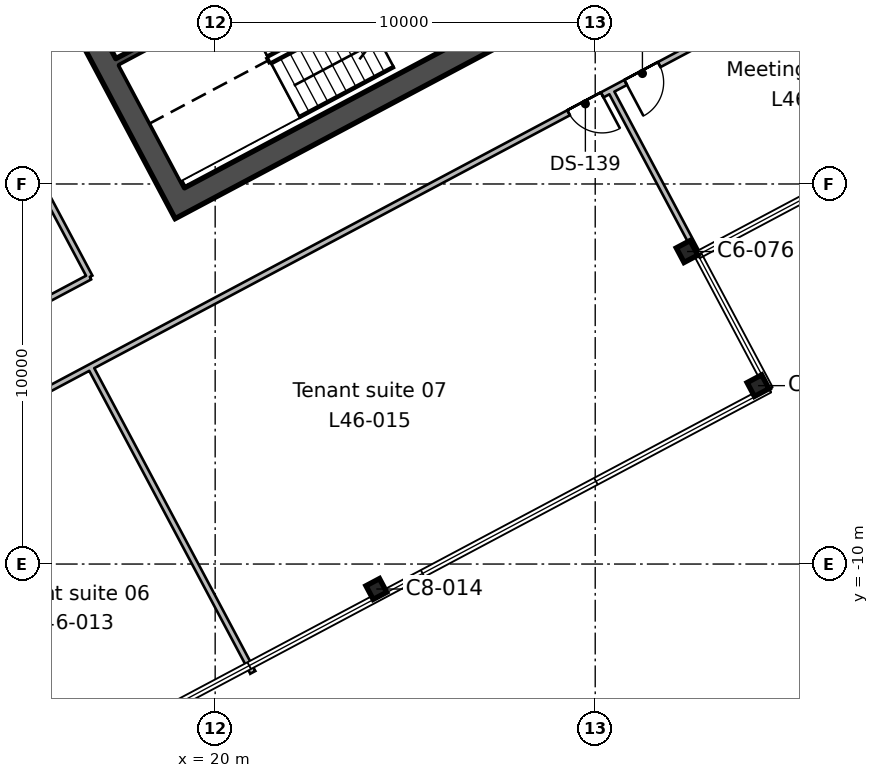
"""IFC4 building model, lengths in metres.
Left out: names, types, materials, properties, quantities, classifications, styles, units other than length and angle.
Written with IfcOpenShell. Run it as: python <this file> out.ifc"""

import sys

from ifc_helpers import new_model, si_unit, direction, frame, frame_2d, origin, origin_2d, place, context, subcontext, project, spatial, rectangle, i_section, extrude, element, fill, save


model = new_model("IFC4")
c1 = context("Model", 3, precision=1e-05, world=origin(), true_north=direction((0.0, 1.0)))
c2 = subcontext(c1, "Body", "Model", "MODEL_VIEW")
j1 = project(units=[si_unit("LENGTHUNIT", "METRE"), si_unit("PLANEANGLEUNIT", "RADIAN")], contexts=[c1])
p1 = place(None, origin())
s1 = spatial("IfcSite", under=j1, at=p1, CompositionType="ELEMENT")
p2 = place(p1, origin())
s2 = spatial("IfcBuilding", under=s1, at=p2, CompositionType="ELEMENT")
p3 = place(p2, frame((0.0, 0.0, 213.0)))
s3 = spatial("IfcBuildingStorey", under=s2, at=p3, CompositionType="ELEMENT", Elevation=213.0)
p4 = place(p3, frame((24.241, -10.657, 0.0), z_axis=(0.0, 0.0, 1.0), x_axis=(0.882947592859, 0.469471562786, 0.0)))
e1 = element("IfcColumn", 1, at=p4, inside=s3, PredefinedType="COLUMN", context=c2, shape_type="SweptSolid", body=[
    extrude(i_section(OverallWidth=0.404, OverallDepth=0.406, WebThickness=0.027, FlangeThickness=0.044, FilletRadius=0.015, at=origin_2d()), origin(), (0.0, 0.0, 1.0), 3.9),
])
for number, where, z_axis, x_axis in (
    (2, (34.285, -5.306, 0.0), (0.0, 0.0, 1.0), (-0.469, 0.883, 0.0)),
    (3, (32.417, -1.777, 0.0), (0.0, 0.0, 1.0), (0.883, 0.469, 0.0)),
):
    element("IfcColumn", number, at=place(p3, frame(where, z_axis=z_axis, x_axis=x_axis)), inside=s3, PredefinedType="COLUMN", context=c2, shape_type="SweptSolid", body=[
        extrude(i_section(OverallWidth=0.412, OverallDepth=0.434, WebThickness=0.036, FlangeThickness=0.057, FilletRadius=0.015, at=origin_2d()), origin(), (0.0, 0.0, 1.0), 3.9),
    ])
p5 = place(p3, frame((19.211, -0.771, 0.0), z_axis=(0.0, 0.0, 1.0), x_axis=(-0.469463742137, 0.882951751127, 0.0)))
e4 = element("IfcWall", 4, at=p5, inside=s3, PredefinedType="SHEAR", context=c2, shape_type="SweptSolid", body=[
    extrude(rectangle(XDim=19.4, YDim=0.6, at=frame_2d((9.7, 0.0))), origin(), (0.0, 0.0, 1.0), 3.9),
])
p6 = place(p5, frame((6.7, 0.0, 0.0)))
e5 = element("IfcOpeningElement", 5, at=p6, cuts=e4, PredefinedType="OPENING", context=c2, shape_type="SweptSolid", body=[
    extrude(rectangle(XDim=2.4, YDim=2.4, at=frame_2d((1.2, 1.2))), frame((0.0, 0.31, 0.0), z_axis=(0.0, -1.0, 0.0), x_axis=(1.0, 0.0, 0.0)), (0.0, 0.0, 1.0), 0.62),
])
p7 = place(p3, frame((19.335, -0.366, 0.0), z_axis=(0.0, 0.0, 1.0), x_axis=(0.88294509198, 0.469476266226, 0.0)))
e6 = element("IfcWall", 6, at=p7, inside=s3, PredefinedType="SHEAR", context=c2, shape_type="SweptSolid", body=[
    extrude(rectangle(XDim=20.2, YDim=0.6, at=frame_2d((10.1, 0.0))), origin(), (0.0, 0.0, 1.0), 3.9),
])
p8 = place(p3, frame((17.434, 3.21, 0.0), z_axis=(0.0, 0.0, 1.0), x_axis=(0.882940221191, 0.469485426614, 0.0)))
e7 = element("IfcWall", 7, at=p8, inside=s3, PredefinedType="SHEAR", context=c2, shape_type="SweptSolid", body=[
    extrude(rectangle(XDim=8.0, YDim=0.2, at=frame_2d((4.0, 0.0))), origin(), (0.0, 0.0, 1.0), 3.9),
])
p9 = place(p3, frame((16.718, -4.815, 0.0), z_axis=(0.0, 0.0, 1.0), x_axis=(0.46943766298, -0.882965616871, 0.0)))
e8 = element("IfcWall", 8, at=p9, inside=s3, PredefinedType="PARTITIONING", context=c2, shape_type="SweptSolid", body=[
    extrude(rectangle(XDim=9.1, YDim=0.15, at=frame_2d((4.55, 0.0))), origin(), (0.0, 0.0, 1.0), 3.54),
])
p10 = place(p3, frame((48.239, 11.944, 0.0), z_axis=(0.0, 0.0, 1.0), x_axis=(-0.882956533409, -0.469454747671, 0.0)))
e9 = element("IfcWall", 9, at=p10, inside=s3, PredefinedType="PARTITIONING", context=c2, shape_type="SweptSolid", body=[
    extrude(rectangle(XDim=39.231, YDim=0.15, at=frame_2d((19.615, 0.0))), origin(), (0.0, 0.0, 1.0), 3.54),
])
p11 = place(p10, frame((20.45, 0.0, 0.0)))
e10 = element("IfcOpeningElement", 10, at=p11, cuts=e9, PredefinedType="OPENING", context=c2, shape_type="SweptSolid", body=[
    extrude(rectangle(XDim=1.0, YDim=2.1, at=frame_2d((0.5, 1.05))), frame((0.0, 0.085, 0.0), z_axis=(0.0, -1.0, 0.0), x_axis=(1.0, 0.0, 0.0)), (0.0, 0.0, 1.0), 0.17),
])
p12 = place(p10, frame((18.75, 0.0, 0.0)))
e11 = element("IfcOpeningElement", 11, at=p12, cuts=e9, PredefinedType="OPENING", context=c2, shape_type="SweptSolid", body=[
    extrude(rectangle(XDim=1.0, YDim=2.1, at=frame_2d((0.5, 1.05))), frame((0.0, 0.085, 0.0), z_axis=(0.0, -1.0, 0.0), x_axis=(1.0, 0.0, 0.0)), (0.0, 0.0, 1.0), 0.17),
])
p13 = place(p3, frame((30.403, 2.462, 0.0), z_axis=(0.0, 0.0, 1.0), x_axis=(0.469519202187, -0.882922260891, 0.0)))
e12 = element("IfcWall", 12, at=p13, inside=s3, PredefinedType="PARTITIONING", context=c2, shape_type="SweptSolid", body=[
    extrude(rectangle(XDim=5.182, YDim=0.15, at=frame_2d((2.591, 0.0))), origin(), (0.0, 0.0, 1.0), 3.54),
])
p14 = place(p3, frame((13.6, -4.094, 0.0), z_axis=(0.0, 0.0, 1.0), x_axis=(0.883048239113, 0.469282225743, 0.0)))
e13 = element("IfcWall", 13, at=p14, inside=s3, PredefinedType="PARTITIONING", context=c2, shape_type="SweptSolid", body=[
    extrude(rectangle(XDim=3.514, YDim=0.15, at=frame_2d((1.757, 0.0))), origin(), (0.0, 0.0, 1.0), 3.54),
])
p15 = place(p3, frame((16.703, -2.445, 0.0), z_axis=(0.0, 0.0, 1.0), x_axis=(-0.469427966585, 0.88297077199, 0.0)))
e14 = element("IfcWall", 14, at=p15, inside=s3, PredefinedType="PARTITIONING", context=c2, shape_type="SweptSolid", body=[
    extrude(rectangle(XDim=6.61, YDim=0.15, at=frame_2d((3.305, 0.0))), origin(), (0.0, 0.0, 1.0), 3.54),
])
p16 = place(p11, origin())
e15 = element("IfcDoor", 15, at=p16, inside=s3, OperationType="SINGLE_SWING_LEFT", PredefinedType="DOOR", context=c2, shape_type="SweptSolid", body=[
    extrude(rectangle(XDim=1.0, YDim=2.1, at=frame_2d((0.5, 1.05))), frame((0.0, 0.025, 0.0), z_axis=(0.0, -1.0, 0.0), x_axis=(1.0, 0.0, 0.0)), (0.0, 0.0, 1.0), 0.05),
])
fill(e10, e15)
p17 = place(p12, origin())
e16 = element("IfcDoor", 16, at=p17, inside=s3, OperationType="SINGLE_SWING_RIGHT", PredefinedType="DOOR", context=c2, shape_type="SweptSolid", body=[
    extrude(rectangle(XDim=1.0, YDim=2.1, at=frame_2d((0.5, 1.05))), frame((0.0, 0.025, 0.0), z_axis=(0.0, -1.0, 0.0), x_axis=(1.0, 0.0, 0.0)), (0.0, 0.0, 1.0), 0.05),
])
fill(e11, e16)
save(model, sys.argv[1])
